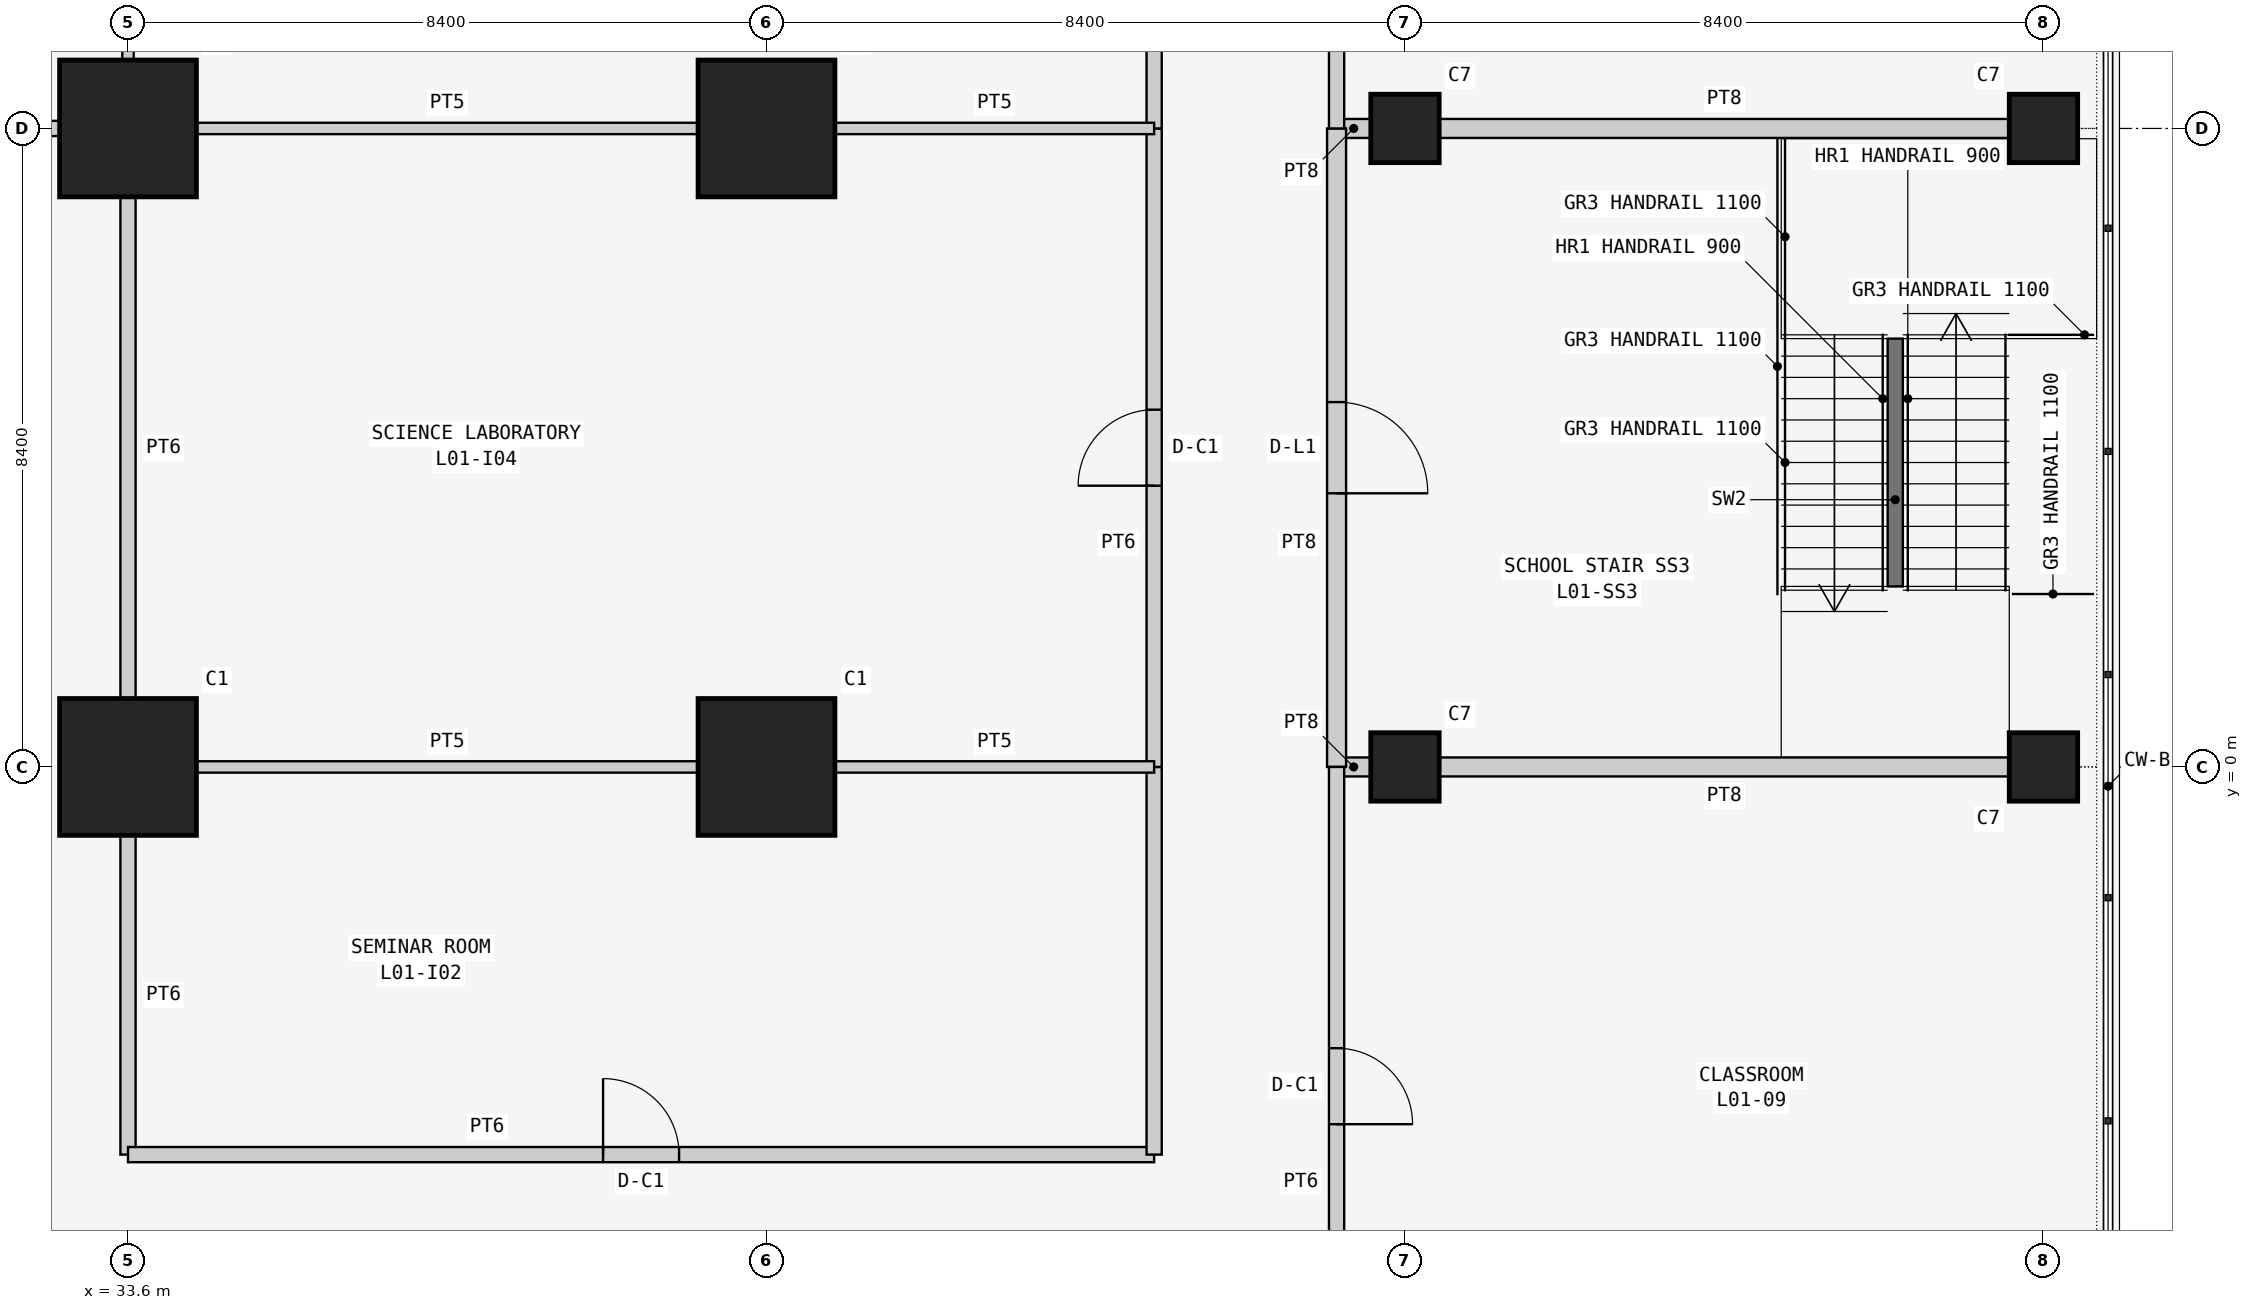
"""IFC4 building model, lengths in metres.
Left out: names, types, materials, properties, quantities, classifications, styles, units other than length and angle.
Written with IfcOpenShell. Run it as: python <this file> out.ifc"""

import sys

from ifc_helpers import new_model, si_unit, direction, frame, frame_2d, origin, origin_2d, place, context, subcontext, project, spatial, rectangle, extrude, element, fill, save


model = new_model("IFC4")
c1 = context("Model", 3, precision=1e-05, world=origin(), true_north=direction((0.0, 1.0)))
c2 = subcontext(c1, "Body", "Model", "MODEL_VIEW")
j1 = project(units=[si_unit("LENGTHUNIT", "METRE"), si_unit("PLANEANGLEUNIT", "RADIAN")], contexts=[c1])
p1 = place(None, origin())
s1 = spatial("IfcSite", under=j1, at=p1, CompositionType="ELEMENT")
p2 = place(p1, origin())
s2 = spatial("IfcBuilding", under=s1, at=p2, CompositionType="ELEMENT")
p3 = place(p2, frame((0.0, 0.0, 6.0)))
s3 = spatial("IfcBuildingStorey", under=s2, at=p3, CompositionType="ELEMENT", Elevation=6.0)
for number, where, z_axis, x_axis in (
    (1, (33.6, 0.0, 0.0), (0.0, 0.0, 1.0), (1.0, 0.0, 0.0)),
    (2, (33.6, 8.4, 0.0), (0.0, 0.0, 1.0), (1.0, 0.0, 0.0)),
    (3, (42.0, 0.0, 0.0), (0.0, 0.0, 1.0), (1.0, 0.0, 0.0)),
    (4, (42.0, 8.4, 0.0), (0.0, 0.0, 1.0), (1.0, 0.0, 0.0)),
):
    element("IfcColumn", number, at=place(p3, frame(where, z_axis=z_axis, x_axis=x_axis)), inside=s3, PredefinedType="COLUMN", context=c2, shape_type="SweptSolid", body=[
        extrude(rectangle(XDim=1.8, YDim=1.8, at=origin_2d()), origin(), (0.0, 0.0, 1.0), 4.5),
    ])
for number, where, z_axis, x_axis in (
    (5, (50.4, 0.0, 0.0), (0.0, 0.0, 1.0), (1.0, 0.0, 0.0)),
    (6, (50.4, 8.4, 0.0), (0.0, 0.0, 1.0), (1.0, 0.0, 0.0)),
    (7, (58.8, 0.0, 0.0), (0.0, 0.0, 1.0), (1.0, 0.0, 0.0)),
    (8, (58.8, 8.4, 0.0), (0.0, 0.0, 1.0), (1.0, 0.0, 0.0)),
):
    element("IfcColumn", number, at=place(p3, frame(where, z_axis=z_axis, x_axis=x_axis)), inside=s3, PredefinedType="COLUMN", context=c2, shape_type="SweptSolid", body=[
        extrude(rectangle(XDim=0.9, YDim=0.9, at=origin_2d()), origin(), (0.0, 0.0, 1.0), 4.5),
    ])
p4 = place(p3, frame((49.95, 0.0, 0.0), z_axis=(0.0, 0.0, 1.0), x_axis=(-1.0, 0.0, 0.0)))
e9 = element("IfcWall", 9, at=p4, inside=s3, PredefinedType="SOLIDWALL", context=c2, shape_type="SweptSolid", body=[
    extrude(rectangle(XDim=0.45, YDim=0.25, at=frame_2d((0.225, 0.0))), origin(), (0.0, 0.0, 1.0), 3.543),
])
p5 = place(p3, frame((58.35, 0.0, 0.0), z_axis=(0.0, 0.0, 1.0), x_axis=(-1.0, 0.0, 0.0)))
e10 = element("IfcWall", 10, at=p5, inside=s3, PredefinedType="SOLIDWALL", context=c2, shape_type="SweptSolid", body=[
    extrude(rectangle(XDim=7.5, YDim=0.25, at=frame_2d((3.75, 0.0))), origin(), (0.0, 0.0, 1.0), 3.543),
])
p6 = place(p3, frame((49.5, 8.4, 0.0), z_axis=(0.0, 0.0, 1.0), x_axis=(1.0, 0.0, 0.0)))
e11 = element("IfcWall", 11, at=p6, inside=s3, PredefinedType="SOLIDWALL", context=c2, shape_type="SweptSolid", body=[
    extrude(rectangle(XDim=0.45, YDim=0.25, at=frame_2d((0.225, 0.0))), origin(), (0.0, 0.0, 1.0), 3.543),
])
p7 = place(p3, frame((50.85, 8.4, 0.0), z_axis=(0.0, 0.0, 1.0), x_axis=(1.0, 0.0, 0.0)))
e12 = element("IfcWall", 12, at=p7, inside=s3, PredefinedType="SOLIDWALL", context=c2, shape_type="SweptSolid", body=[
    extrude(rectangle(XDim=7.5, YDim=0.25, at=frame_2d((3.75, 0.0))), origin(), (0.0, 0.0, 1.0), 3.543),
])
p8 = place(p3, frame((49.5, 0.0, 0.0), z_axis=(0.0, 0.0, 1.0), x_axis=(0.0, 1.0, 0.0)))
e13 = element("IfcWall", 13, at=p8, inside=s3, PredefinedType="SOLIDWALL", context=c2, shape_type="SweptSolid", body=[
    extrude(rectangle(XDim=8.4, YDim=0.25, at=frame_2d((4.2, 0.0))), origin(), (0.0, 0.0, 1.0), 4.3),
])
p9 = place(p8, frame((3.6, 0.0, 0.0)))
e14 = element("IfcOpeningElement", 14, at=p9, cuts=e13, PredefinedType="OPENING", context=c2, shape_type="SweptSolid", body=[
    extrude(rectangle(XDim=1.2, YDim=2.1, at=frame_2d((0.6, 1.05))), frame((0.0, 0.135, 0.0), z_axis=(0.0, -1.0, 0.0), x_axis=(1.0, 0.0, 0.0)), (0.0, 0.0, 1.0), 0.27),
])
p10 = place(p3, frame((49.5, -8.4, 0.0), z_axis=(0.0, 0.0, 1.0), x_axis=(0.0, 1.0, 0.0)))
e15 = element("IfcWall", 15, at=p10, inside=s3, PredefinedType="PARTITIONING", context=c2, shape_type="SweptSolid", body=[
    extrude(rectangle(XDim=8.4, YDim=0.2, at=frame_2d((4.2, 0.0))), origin(), (0.0, 0.0, 1.0), 4.3),
])
p11 = place(p10, frame((3.7, 0.0, 0.0)))
e16 = element("IfcOpeningElement", 16, at=p11, cuts=e15, PredefinedType="OPENING", context=c2, shape_type="SweptSolid", body=[
    extrude(rectangle(XDim=1.0, YDim=2.1, at=frame_2d((0.5, 1.05))), frame((0.0, 0.11, 0.0), z_axis=(0.0, -1.0, 0.0), x_axis=(1.0, 0.0, 0.0)), (0.0, 0.0, 1.0), 0.22),
])
p12 = place(p3, frame((49.5, 8.4, 0.0), z_axis=(0.0, 0.0, 1.0), x_axis=(0.0, 1.0, 0.0)))
e17 = element("IfcWall", 17, at=p12, inside=s3, PredefinedType="PARTITIONING", context=c2, shape_type="SweptSolid", body=[
    extrude(rectangle(XDim=7.5, YDim=0.2, at=frame_2d((3.75, 0.0))), origin(), (0.0, 0.0, 1.0), 4.3),
])
p13 = place(p12, frame((3.25, 0.0, 0.0)))
e18 = element("IfcOpeningElement", 18, at=p13, cuts=e17, PredefinedType="OPENING", context=c2, shape_type="SweptSolid", body=[
    extrude(rectangle(XDim=1.0, YDim=2.1, at=frame_2d((0.5, 1.05))), frame((0.0, 0.11, 0.0), z_axis=(0.0, -1.0, 0.0), x_axis=(1.0, 0.0, 0.0)), (0.0, 0.0, 1.0), 0.22),
])
p14 = place(p3, frame((33.6, -0.9, 0.0), z_axis=(0.0, 0.0, 1.0), x_axis=(0.0, -1.0, 0.0)))
e19 = element("IfcWall", 19, at=p14, inside=s3, PredefinedType="PARTITIONING", context=c2, shape_type="SweptSolid", body=[
    extrude(rectangle(XDim=4.2, YDim=0.2, at=frame_2d((2.1, 0.0))), origin(), (0.0, 0.0, 1.0), 3.543),
])
p15 = place(p3, frame((33.6, -5.1, 0.0), z_axis=(0.0, 0.0, 1.0), x_axis=(1.0, 0.0, 0.0)))
e20 = element("IfcWall", 20, at=p15, inside=s3, PredefinedType="PARTITIONING", context=c2, shape_type="SweptSolid", body=[
    extrude(rectangle(XDim=13.5, YDim=0.2, at=frame_2d((6.75, 0.0))), origin(), (0.0, 0.0, 1.0), 4.3),
])
p16 = place(p15, frame((6.25, 0.0, 0.0)))
e21 = element("IfcOpeningElement", 21, at=p16, cuts=e20, PredefinedType="OPENING", context=c2, shape_type="SweptSolid", body=[
    extrude(rectangle(XDim=1.0, YDim=2.1, at=frame_2d((0.5, 1.05))), frame((0.0, 0.11, 0.0), z_axis=(0.0, -1.0, 0.0), x_axis=(1.0, 0.0, 0.0)), (0.0, 0.0, 1.0), 0.22),
])
p17 = place(p3, frame((47.1, -5.1, 0.0), z_axis=(0.0, 0.0, 1.0), x_axis=(0.0, 1.0, 0.0)))
e22 = element("IfcWall", 22, at=p17, inside=s3, PredefinedType="PARTITIONING", context=c2, shape_type="SweptSolid", body=[
    extrude(rectangle(XDim=5.1, YDim=0.2, at=frame_2d((2.55, 0.0))), origin(), (0.0, 0.0, 1.0), 4.3),
])
p18 = place(p3, frame((33.6, 7.5, 0.0), z_axis=(0.0, 0.0, 1.0), x_axis=(0.0, -1.0, 0.0)))
e23 = element("IfcWall", 23, at=p18, inside=s3, PredefinedType="PARTITIONING", context=c2, shape_type="SweptSolid", body=[
    extrude(rectangle(XDim=6.6, YDim=0.2, at=frame_2d((3.3, 0.0))), origin(), (0.0, 0.0, 1.0), 3.543),
])
p19 = place(p3, frame((47.1, 0.0, 0.0), z_axis=(0.0, 0.0, 1.0), x_axis=(0.0, 1.0, 0.0)))
e24 = element("IfcWall", 24, at=p19, inside=s3, PredefinedType="PARTITIONING", context=c2, shape_type="SweptSolid", body=[
    extrude(rectangle(XDim=8.4, YDim=0.2, at=frame_2d((4.2, 0.0))), origin(), (0.0, 0.0, 1.0), 4.3),
])
p20 = place(p19, frame((3.7, 0.0, 0.0)))
e25 = element("IfcOpeningElement", 25, at=p20, cuts=e24, PredefinedType="OPENING", context=c2, shape_type="SweptSolid", body=[
    extrude(rectangle(XDim=1.0, YDim=2.1, at=frame_2d((0.5, 1.05))), frame((0.0, 0.11, 0.0), z_axis=(0.0, -1.0, 0.0), x_axis=(1.0, 0.0, 0.0)), (0.0, 0.0, 1.0), 0.22),
])
p21 = place(p3, frame((26.1, 8.4, 0.0), z_axis=(0.0, 0.0, 1.0), x_axis=(1.0, 0.0, 0.0)))
e26 = element("IfcWall", 26, at=p21, inside=s3, PredefinedType="PARTITIONING", context=c2, shape_type="SweptSolid", body=[
    extrude(rectangle(XDim=6.6, YDim=0.2, at=frame_2d((3.3, 0.0))), origin(), (0.0, 0.0, 1.0), 3.543),
])
p22 = place(p21, frame((2.4, 0.0, 0.0)))
e27 = element("IfcOpeningElement", 27, at=p22, cuts=e26, PredefinedType="OPENING", context=c2, shape_type="SweptSolid", body=[
    extrude(rectangle(XDim=1.8, YDim=2.4, at=frame_2d((0.9, 1.2))), frame((0.0, 0.11, 0.0), z_axis=(0.0, -1.0, 0.0), x_axis=(1.0, 0.0, 0.0)), (0.0, 0.0, 1.0), 0.22),
])
p23 = place(p3, frame((47.1, 8.4, 0.0), z_axis=(0.0, 0.0, 1.0), x_axis=(0.0, 1.0, 0.0)))
e28 = element("IfcWall", 28, at=p23, inside=s3, PredefinedType="PARTITIONING", context=c2, shape_type="SweptSolid", body=[
    extrude(rectangle(XDim=8.4, YDim=0.2, at=frame_2d((4.2, 0.0))), origin(), (0.0, 0.0, 1.0), 4.3),
])
p24 = place(p23, frame((3.7, 0.0, 0.0)))
e29 = element("IfcOpeningElement", 29, at=p24, cuts=e28, PredefinedType="OPENING", context=c2, shape_type="SweptSolid", body=[
    extrude(rectangle(XDim=1.0, YDim=2.1, at=frame_2d((0.5, 1.05))), frame((0.0, 0.11, 0.0), z_axis=(0.0, -1.0, 0.0), x_axis=(1.0, 0.0, 0.0)), (0.0, 0.0, 1.0), 0.22),
])
p25 = place(p3, frame((34.5, 0.0, 0.0), z_axis=(0.0, 0.0, 1.0), x_axis=(1.0, 0.0, 0.0)))
e30 = element("IfcWall", 30, at=p25, inside=s3, PredefinedType="PARTITIONING", context=c2, shape_type="SweptSolid", body=[
    extrude(rectangle(XDim=6.6, YDim=0.15, at=frame_2d((3.3, 0.0))), origin(), (0.0, 0.0, 1.0), 3.543),
])
p26 = place(p3, frame((42.9, 0.0, 0.0), z_axis=(0.0, 0.0, 1.0), x_axis=(1.0, 0.0, 0.0)))
e31 = element("IfcWall", 31, at=p26, inside=s3, PredefinedType="PARTITIONING", context=c2, shape_type="SweptSolid", body=[
    extrude(rectangle(XDim=4.2, YDim=0.15, at=frame_2d((2.1, 0.0))), origin(), (0.0, 0.0, 1.0), 3.543),
])
p27 = place(p3, frame((34.5, 8.4, 0.0), z_axis=(0.0, 0.0, 1.0), x_axis=(1.0, 0.0, 0.0)))
e32 = element("IfcWall", 32, at=p27, inside=s3, PredefinedType="PARTITIONING", context=c2, shape_type="SweptSolid", body=[
    extrude(rectangle(XDim=6.6, YDim=0.15, at=frame_2d((3.3, 0.0))), origin(), (0.0, 0.0, 1.0), 3.543),
])
p28 = place(p3, frame((42.9, 8.4, 0.0), z_axis=(0.0, 0.0, 1.0), x_axis=(1.0, 0.0, 0.0)))
e33 = element("IfcWall", 33, at=p28, inside=s3, PredefinedType="PARTITIONING", context=c2, shape_type="SweptSolid", body=[
    extrude(rectangle(XDim=4.2, YDim=0.15, at=frame_2d((2.1, 0.0))), origin(), (0.0, 0.0, 1.0), 3.543),
])
p29 = place(p3, frame((33.6, 15.9, 0.0), z_axis=(0.0, 0.0, 1.0), x_axis=(0.0, -1.0, 0.0)))
e34 = element("IfcWall", 34, at=p29, inside=s3, PredefinedType="PARTITIONING", context=c2, shape_type="SweptSolid", body=[
    extrude(rectangle(XDim=6.6, YDim=0.15, at=frame_2d((3.3, 0.0))), origin(), (0.0, 0.0, 1.0), 3.543),
])
p30 = place(p3, frame((56.85, 2.375, 0.0), z_axis=(0.0, 0.0, 1.0), x_axis=(0.0, 1.0, 0.0)))
e35 = element("IfcWall", 35, at=p30, inside=s3, PredefinedType="SOLIDWALL", context=c2, shape_type="SweptSolid", body=[
    extrude(rectangle(XDim=3.26, YDim=0.2, at=frame_2d((1.63, 0.0))), origin(), (0.0, 0.0, 1.0), 4.5),
])
p31 = place(p9, frame((1.2, 0.0, 0.0), z_axis=(0.0, 0.0, 1.0), x_axis=(-1.0, 0.0, 0.0)))
e36 = element("IfcDoor", 36, at=p31, inside=s3, OperationType="SINGLE_SWING_RIGHT", PredefinedType="DOOR", context=c2, shape_type="SweptSolid", body=[
    extrude(rectangle(XDim=1.2, YDim=2.1, at=frame_2d((0.6, 1.05))), frame((0.0, 0.025, 0.0), z_axis=(0.0, -1.0, 0.0), x_axis=(1.0, 0.0, 0.0)), (0.0, 0.0, 1.0), 0.05),
])
fill(e14, e36)
p32 = place(p11, frame((1.0, 0.0, 0.0), z_axis=(0.0, 0.0, 1.0), x_axis=(-1.0, 0.0, 0.0)))
e37 = element("IfcDoor", 37, at=p32, inside=s3, OperationType="SINGLE_SWING_RIGHT", PredefinedType="DOOR", context=c2, shape_type="SweptSolid", body=[
    extrude(rectangle(XDim=1.0, YDim=2.1, at=frame_2d((0.5, 1.05))), frame((0.0, 0.025, 0.0), z_axis=(0.0, -1.0, 0.0), x_axis=(1.0, 0.0, 0.0)), (0.0, 0.0, 1.0), 0.05),
])
fill(e16, e37)
p33 = place(p16, origin())
e38 = element("IfcDoor", 38, at=p33, inside=s3, OperationType="SINGLE_SWING_LEFT", PredefinedType="DOOR", context=c2, shape_type="SweptSolid", body=[
    extrude(rectangle(XDim=1.0, YDim=2.1, at=frame_2d((0.5, 1.05))), frame((0.0, 0.025, 0.0), z_axis=(0.0, -1.0, 0.0), x_axis=(1.0, 0.0, 0.0)), (0.0, 0.0, 1.0), 0.05),
])
fill(e21, e38)
p34 = place(p20, origin())
e39 = element("IfcDoor", 39, at=p34, inside=s3, OperationType="SINGLE_SWING_LEFT", PredefinedType="DOOR", context=c2, shape_type="SweptSolid", body=[
    extrude(rectangle(XDim=1.0, YDim=2.1, at=frame_2d((0.5, 1.05))), frame((0.0, 0.025, 0.0), z_axis=(0.0, -1.0, 0.0), x_axis=(1.0, 0.0, 0.0)), (0.0, 0.0, 1.0), 0.05),
])
fill(e25, e39)
save(model, sys.argv[1])
